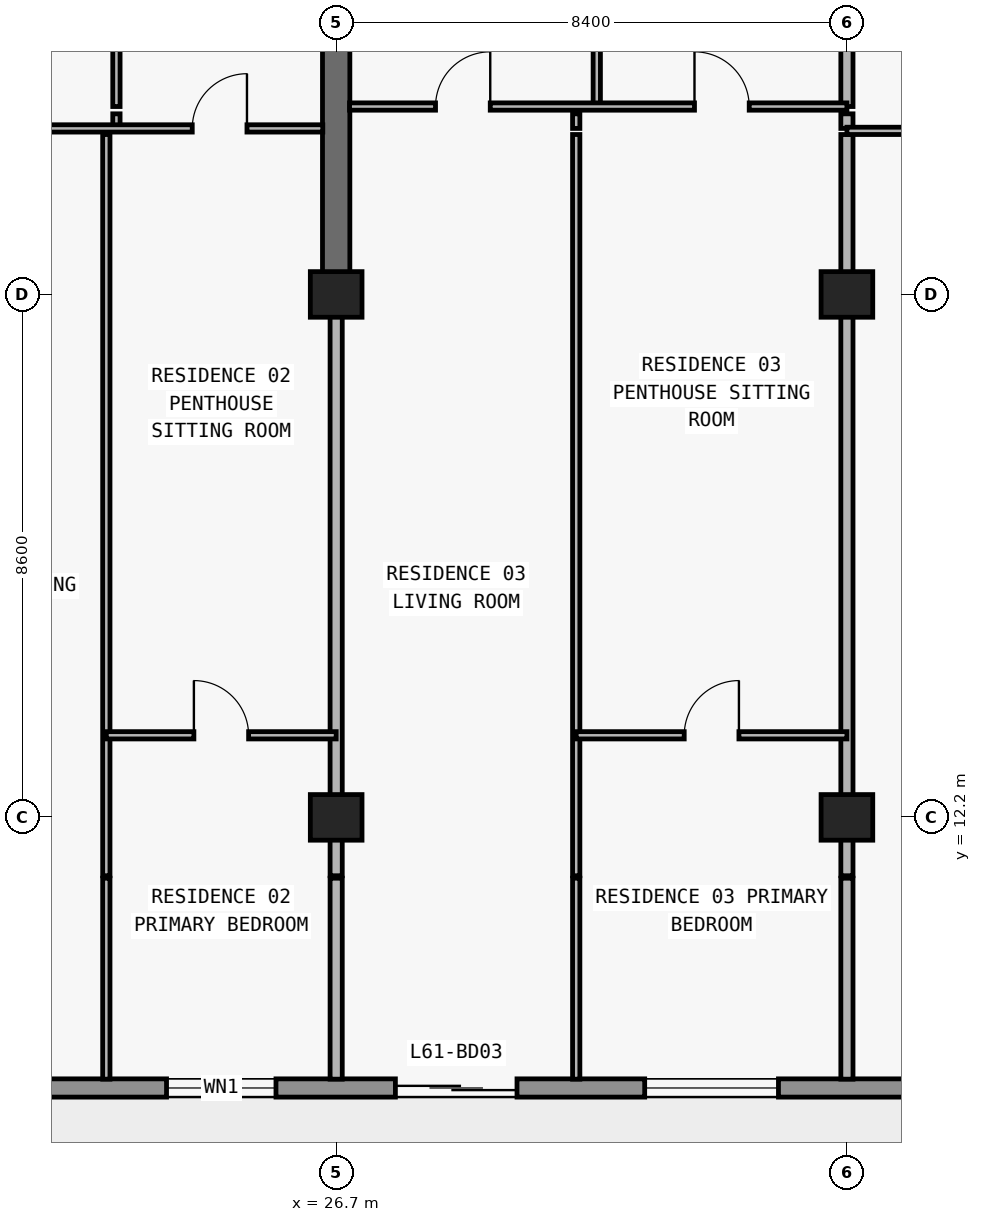
"""IFC4 building model, lengths in metres.
Left out: names, types, materials, properties, quantities, classifications, styles, units other than length and angle.
Written with IfcOpenShell. Run it as: python <this file> out.ifc"""

import sys

from ifc_helpers import new_model, si_unit, direction, frame, frame_2d, origin, origin_2d, place, context, subcontext, project, spatial, rectangle, extrude, element, fill, save


model = new_model("IFC4")
c1 = context("Model", 3, precision=1e-05, world=origin(), true_north=direction((0.0, 1.0)))
c2 = subcontext(c1, "Body", "Model", "MODEL_VIEW")
j1 = project(units=[si_unit("LENGTHUNIT", "METRE"), si_unit("PLANEANGLEUNIT", "RADIAN")], contexts=[c1])
p1 = place(None, origin())
s1 = spatial("IfcSite", under=j1, at=p1, CompositionType="ELEMENT")
p2 = place(p1, origin())
s2 = spatial("IfcBuilding", under=s1, at=p2, CompositionType="ELEMENT")
p3 = place(p2, frame((0.0, 0.0, 218.1)))
s3 = spatial("IfcBuildingStorey", under=s2, at=p3, CompositionType="ELEMENT", Elevation=218.1)
for number, where, z_axis, x_axis in (
    (1, (26.7, 12.2, 0.0), (0.0, 0.0, 1.0), (1.0, 0.0, 0.0)),
    (2, (35.1, 12.2, 0.0), (0.0, 0.0, 1.0), (1.0, 0.0, 0.0)),
    (3, (26.7, 20.8, 0.0), (0.0, 0.0, 1.0), (1.0, 0.0, 0.0)),
    (4, (35.1, 20.8, 0.0), (0.0, 0.0, 1.0), (1.0, 0.0, 0.0)),
):
    element("IfcColumn", number, at=place(p3, frame(where, z_axis=z_axis, x_axis=x_axis)), inside=s3, PredefinedType="COLUMN", context=c2, shape_type="SweptSolid", body=[
        extrude(rectangle(XDim=0.85, YDim=0.75, at=origin_2d()), origin(), (0.0, 0.0, 1.0), 3.0),
    ])
p4 = place(p3, frame((26.7, 20.8, 0.0), z_axis=(0.0, 0.0, 1.0), x_axis=(0.0, 1.0, 0.0)))
e5 = element("IfcWall", 5, at=p4, inside=s3, PredefinedType="SHEAR", context=c2, shape_type="SweptSolid", body=[
    extrude(rectangle(XDim=8.6, YDim=0.45, at=frame_2d((4.3, 0.0))), origin(), (0.0, 0.0, 1.0), 3.0),
])
p5 = place(p3, frame((67.7, 7.75, 0.0), z_axis=(0.0, 0.0, 1.0), x_axis=(-1.0, 0.0, 0.0)))
e6 = element("IfcWall", 6, at=p5, inside=s3, PredefinedType="STANDARD", context=c2, shape_type="SweptSolid", body=[
    extrude(rectangle(XDim=57.6, YDim=0.3, at=frame_2d((28.8, 0.0))), origin(), (0.0, 0.0, 1.0), 3.0),
])
p6 = place(p5, frame((54.673, 0.0, 0.0)))
e7 = element("IfcOpeningElement", 7, at=p6, cuts=e6, PredefinedType="OPENING", context=c2, shape_type="SweptSolid", body=[
    extrude(rectangle(XDim=2.0, YDim=2.3, at=frame_2d((1.0, 1.15))), frame((0.0, 0.16, 0.0), z_axis=(0.0, -1.0, 0.0), x_axis=(1.0, 0.0, 0.0)), (0.0, 0.0, 1.0), 0.32),
])
p7 = place(p5, frame((50.473, 0.0, 0.85)))
e8 = element("IfcOpeningElement", 8, at=p7, cuts=e6, PredefinedType="OPENING", context=c2, shape_type="SweptSolid", body=[
    extrude(rectangle(XDim=2.2, YDim=1.55, at=frame_2d((1.1, 0.775))), frame((0.0, 0.16, 0.0), z_axis=(0.0, -1.0, 0.0), x_axis=(1.0, 0.0, 0.0)), (0.0, 0.0, 1.0), 0.32),
])
p8 = place(p5, frame((46.09, 0.0, 0.0)))
e9 = element("IfcOpeningElement", 9, at=p8, cuts=e6, PredefinedType="OPENING", context=c2, shape_type="SweptSolid", body=[
    extrude(rectangle(XDim=2.0, YDim=2.3, at=frame_2d((1.0, 1.15))), frame((0.0, 0.16, 0.0), z_axis=(0.0, -1.0, 0.0), x_axis=(1.0, 0.0, 0.0)), (0.0, 0.0, 1.0), 0.32),
])
p9 = place(p5, frame((41.99, 0.0, 0.85)))
e10 = element("IfcOpeningElement", 10, at=p9, cuts=e6, PredefinedType="OPENING", context=c2, shape_type="SweptSolid", body=[
    extrude(rectangle(XDim=1.8, YDim=1.55, at=frame_2d((0.9, 0.775))), frame((0.0, 0.16, 0.0), z_axis=(0.0, -1.0, 0.0), x_axis=(1.0, 0.0, 0.0)), (0.0, 0.0, 1.0), 0.32),
])
p10 = place(p5, frame((38.026, 0.0, 0.0)))
e11 = element("IfcOpeningElement", 11, at=p10, cuts=e6, PredefinedType="OPENING", context=c2, shape_type="SweptSolid", body=[
    extrude(rectangle(XDim=2.0, YDim=2.3, at=frame_2d((1.0, 1.15))), frame((0.0, 0.16, 0.0), z_axis=(0.0, -1.0, 0.0), x_axis=(1.0, 0.0, 0.0)), (0.0, 0.0, 1.0), 0.32),
])
p11 = place(p5, frame((33.726, 0.0, 0.85)))
e12 = element("IfcOpeningElement", 12, at=p11, cuts=e6, PredefinedType="OPENING", context=c2, shape_type="SweptSolid", body=[
    extrude(rectangle(XDim=2.2, YDim=1.55, at=frame_2d((1.1, 0.775))), frame((0.0, 0.16, 0.0), z_axis=(0.0, -1.0, 0.0), x_axis=(1.0, 0.0, 0.0)), (0.0, 0.0, 1.0), 0.32),
])
p12 = place(p5, frame((29.51, 0.0, 0.0)))
e13 = element("IfcOpeningElement", 13, at=p12, cuts=e6, PredefinedType="OPENING", context=c2, shape_type="SweptSolid", body=[
    extrude(rectangle(XDim=2.0, YDim=2.3, at=frame_2d((1.0, 1.15))), frame((0.0, 0.16, 0.0), z_axis=(0.0, -1.0, 0.0), x_axis=(1.0, 0.0, 0.0)), (0.0, 0.0, 1.0), 0.32),
])
p13 = place(p5, frame((25.81, 0.0, 0.85)))
e14 = element("IfcOpeningElement", 14, at=p13, cuts=e6, PredefinedType="OPENING", context=c2, shape_type="SweptSolid", body=[
    extrude(rectangle(XDim=1.8, YDim=1.55, at=frame_2d((0.9, 0.775))), frame((0.0, 0.16, 0.0), z_axis=(0.0, -1.0, 0.0), x_axis=(1.0, 0.0, 0.0)), (0.0, 0.0, 1.0), 0.32),
])
p14 = place(p5, frame((22.026, 0.0, 0.0)))
e15 = element("IfcOpeningElement", 15, at=p14, cuts=e6, PredefinedType="OPENING", context=c2, shape_type="SweptSolid", body=[
    extrude(rectangle(XDim=2.0, YDim=2.3, at=frame_2d((1.0, 1.15))), frame((0.0, 0.16, 0.0), z_axis=(0.0, -1.0, 0.0), x_axis=(1.0, 0.0, 0.0)), (0.0, 0.0, 1.0), 0.32),
])
p15 = place(p5, frame((17.726, 0.0, 0.85)))
e16 = element("IfcOpeningElement", 16, at=p15, cuts=e6, PredefinedType="OPENING", context=c2, shape_type="SweptSolid", body=[
    extrude(rectangle(XDim=2.2, YDim=1.55, at=frame_2d((1.1, 0.775))), frame((0.0, 0.16, 0.0), z_axis=(0.0, -1.0, 0.0), x_axis=(1.0, 0.0, 0.0)), (0.0, 0.0, 1.0), 0.32),
])
p16 = place(p5, frame((13.29, 0.0, 0.0)))
e17 = element("IfcOpeningElement", 17, at=p16, cuts=e6, PredefinedType="OPENING", context=c2, shape_type="SweptSolid", body=[
    extrude(rectangle(XDim=2.0, YDim=2.3, at=frame_2d((1.0, 1.15))), frame((0.0, 0.16, 0.0), z_axis=(0.0, -1.0, 0.0), x_axis=(1.0, 0.0, 0.0)), (0.0, 0.0, 1.0), 0.32),
])
p17 = place(p5, frame((9.19, 0.0, 0.85)))
e18 = element("IfcOpeningElement", 18, at=p17, cuts=e6, PredefinedType="OPENING", context=c2, shape_type="SweptSolid", body=[
    extrude(rectangle(XDim=1.8, YDim=1.55, at=frame_2d((0.9, 0.775))), frame((0.0, 0.16, 0.0), z_axis=(0.0, -1.0, 0.0), x_axis=(1.0, 0.0, 0.0)), (0.0, 0.0, 1.0), 0.32),
])
p18 = place(p5, frame((5.273, 0.0, 0.0)))
e19 = element("IfcOpeningElement", 19, at=p18, cuts=e6, PredefinedType="OPENING", context=c2, shape_type="SweptSolid", body=[
    extrude(rectangle(XDim=2.0, YDim=2.3, at=frame_2d((1.0, 1.15))), frame((0.0, 0.16, 0.0), z_axis=(0.0, -1.0, 0.0), x_axis=(1.0, 0.0, 0.0)), (0.0, 0.0, 1.0), 0.32),
])
p19 = place(p5, frame((1.073, 0.0, 0.85)))
e20 = element("IfcOpeningElement", 20, at=p19, cuts=e6, PredefinedType="OPENING", context=c2, shape_type="SweptSolid", body=[
    extrude(rectangle(XDim=2.2, YDim=1.55, at=frame_2d((1.1, 0.775))), frame((0.0, 0.16, 0.0), z_axis=(0.0, -1.0, 0.0), x_axis=(1.0, 0.0, 0.0)), (0.0, 0.0, 1.0), 0.32),
])
p20 = place(p3, frame((22.92, 7.895, 0.0), z_axis=(0.0, 0.0, 1.0), x_axis=(0.0, 1.0, 0.0)))
e21 = element("IfcWall", 21, at=p20, inside=s3, PredefinedType="PARTITIONING", context=c2, shape_type="SweptSolid", body=[
    extrude(rectangle(XDim=3.305, YDim=0.12, at=frame_2d((1.652, 0.0))), origin(), (0.0, 0.0, 1.0), 3.0),
])
p21 = place(p3, frame((22.92, 11.24, 0.0), z_axis=(0.0, 0.0, 1.0), x_axis=(0.0, 1.0, 0.0)))
e22 = element("IfcWall", 22, at=p21, inside=s3, PredefinedType="PARTITIONING", context=c2, shape_type="SweptSolid", body=[
    extrude(rectangle(XDim=12.19, YDim=0.12, at=frame_2d((6.095, 0.0))), origin(), (0.0, 0.0, 1.0), 3.0),
])
p22 = place(p3, frame((23.086, 23.53, 0.0), z_axis=(0.0, 0.0, 1.0), x_axis=(0.0, 1.0, 0.0)))
e23 = element("IfcWall", 23, at=p22, inside=s3, PredefinedType="PARTITIONING", context=c2, shape_type="SweptSolid", body=[
    extrude(rectangle(XDim=0.24, YDim=0.12, at=frame_2d((0.12, 0.0))), origin(), (0.0, 0.0, 1.0), 3.0),
])
p23 = place(p3, frame((23.086, 23.89, 0.0), z_axis=(0.0, 0.0, 1.0), x_axis=(0.0, 1.0, 0.0)))
e24 = element("IfcWall", 24, at=p23, inside=s3, PredefinedType="PARTITIONING", context=c2, shape_type="SweptSolid", body=[
    extrude(rectangle(XDim=4.69, YDim=0.12, at=frame_2d((2.345, 0.0))), origin(), (0.0, 0.0, 1.0), 3.0),
])
p24 = place(p23, frame((1.895, 0.0, 0.0)))
e25 = element("IfcOpeningElement", 25, at=p24, cuts=e24, PredefinedType="OPENING", context=c2, shape_type="SweptSolid", body=[
    extrude(rectangle(XDim=0.9, YDim=2.15, at=frame_2d((0.45, 1.075))), frame((0.0, 0.07, 0.0), z_axis=(0.0, -1.0, 0.0), x_axis=(1.0, 0.0, 0.0)), (0.0, 0.0, 1.0), 0.14),
])
p25 = place(p3, frame((26.7, 7.895, 0.0), z_axis=(0.0, 0.0, 1.0), x_axis=(0.0, 1.0, 0.0)))
e26 = element("IfcWall", 26, at=p25, inside=s3, PredefinedType="PARTITIONING", context=c2, shape_type="SweptSolid", body=[
    extrude(rectangle(XDim=3.305, YDim=0.2, at=frame_2d((1.652, 0.0))), origin(), (0.0, 0.0, 1.0), 3.0),
])
p26 = place(p3, frame((26.7, 11.24, 0.0), z_axis=(0.0, 0.0, 1.0), x_axis=(0.0, 1.0, 0.0)))
e27 = element("IfcWall", 27, at=p26, inside=s3, PredefinedType="PARTITIONING", context=c2, shape_type="SweptSolid", body=[
    extrude(rectangle(XDim=9.555, YDim=0.2, at=frame_2d((4.777, 0.0))), origin(), (0.0, 0.0, 1.0), 2.213),
])
p27 = place(p3, frame((30.648, 7.895, 0.0), z_axis=(0.0, 0.0, 1.0), x_axis=(0.0, 1.0, 0.0)))
e28 = element("IfcWall", 28, at=p27, inside=s3, PredefinedType="PARTITIONING", context=c2, shape_type="SweptSolid", body=[
    extrude(rectangle(XDim=3.305, YDim=0.12, at=frame_2d((1.652, 0.0))), origin(), (0.0, 0.0, 1.0), 3.0),
])
p28 = place(p3, frame((30.648, 11.24, 0.0), z_axis=(0.0, 0.0, 1.0), x_axis=(0.0, 1.0, 0.0)))
e29 = element("IfcWall", 29, at=p28, inside=s3, PredefinedType="PARTITIONING", context=c2, shape_type="SweptSolid", body=[
    extrude(rectangle(XDim=12.19, YDim=0.12, at=frame_2d((6.095, 0.0))), origin(), (0.0, 0.0, 1.0), 3.0),
])
p29 = place(p3, frame((30.648, 23.53, 0.0), z_axis=(0.0, 0.0, 1.0), x_axis=(0.0, 1.0, 0.0)))
e30 = element("IfcWall", 30, at=p29, inside=s3, PredefinedType="PARTITIONING", context=c2, shape_type="SweptSolid", body=[
    extrude(rectangle(XDim=0.24, YDim=0.12, at=frame_2d((0.12, 0.0))), origin(), (0.0, 0.0, 1.0), 3.0),
])
p30 = place(p3, frame((30.986, 23.89, 0.0), z_axis=(0.0, 0.0, 1.0), x_axis=(0.0, 1.0, 0.0)))
e31 = element("IfcWall", 31, at=p30, inside=s3, PredefinedType="PARTITIONING", context=c2, shape_type="SweptSolid", body=[
    extrude(rectangle(XDim=4.69, YDim=0.12, at=frame_2d((2.345, 0.0))), origin(), (0.0, 0.0, 1.0), 2.449),
])
p31 = place(p30, frame((1.895, 0.0, 0.0)))
e32 = element("IfcOpeningElement", 32, at=p31, cuts=e31, PredefinedType="OPENING", context=c2, shape_type="SweptSolid", body=[
    extrude(rectangle(XDim=0.9, YDim=2.15, at=frame_2d((0.45, 1.075))), frame((0.0, 0.07, 0.0), z_axis=(0.0, -1.0, 0.0), x_axis=(1.0, 0.0, 0.0)), (0.0, 0.0, 1.0), 0.14),
])
p32 = place(p3, frame((35.1, 7.895, 0.0), z_axis=(0.0, 0.0, 1.0), x_axis=(0.0, 1.0, 0.0)))
e33 = element("IfcWall", 33, at=p32, inside=s3, PredefinedType="PARTITIONING", context=c2, shape_type="SweptSolid", body=[
    extrude(rectangle(XDim=3.305, YDim=0.2, at=frame_2d((1.652, 0.0))), origin(), (0.0, 0.0, 1.0), 3.0),
])
p33 = place(p3, frame((35.1, 11.24, 0.0), z_axis=(0.0, 0.0, 1.0), x_axis=(0.0, 1.0, 0.0)))
e34 = element("IfcWall", 34, at=p33, inside=s3, PredefinedType="PARTITIONING", context=c2, shape_type="SweptSolid", body=[
    extrude(rectangle(XDim=12.19, YDim=0.2, at=frame_2d((6.095, 0.0))), origin(), (0.0, 0.0, 1.0), 2.213),
])
p34 = place(p3, frame((35.1, 23.53, 0.0), z_axis=(0.0, 0.0, 1.0), x_axis=(0.0, 1.0, 0.0)))
e35 = element("IfcWall", 35, at=p34, inside=s3, PredefinedType="PARTITIONING", context=c2, shape_type="SweptSolid", body=[
    extrude(rectangle(XDim=0.24, YDim=0.2, at=frame_2d((0.12, 0.0))), origin(), (0.0, 0.0, 1.0), 2.213),
])
p35 = place(p3, frame((35.1, 23.89, 0.0), z_axis=(0.0, 0.0, 1.0), x_axis=(0.0, 1.0, 0.0)))
e36 = element("IfcWall", 36, at=p35, inside=s3, PredefinedType="PARTITIONING", context=c2, shape_type="SweptSolid", body=[
    extrude(rectangle(XDim=4.69, YDim=0.2, at=frame_2d((2.345, 0.0))), origin(), (0.0, 0.0, 1.0), 2.213),
])
p36 = place(p3, frame((22.92, 13.55, 0.0), z_axis=(0.0, 0.0, 1.0), x_axis=(1.0, 0.0, 0.0)))
e37 = element("IfcWall", 37, at=p36, inside=s3, PredefinedType="PARTITIONING", context=c2, shape_type="SweptSolid", body=[
    extrude(rectangle(XDim=3.78, YDim=0.12, at=frame_2d((1.89, 0.0))), origin(), (0.0, 0.0, 1.0), 3.0),
])
p37 = place(p36, frame((1.44, 0.0, 0.0)))
e38 = element("IfcOpeningElement", 38, at=p37, cuts=e37, PredefinedType="OPENING", context=c2, shape_type="SweptSolid", body=[
    extrude(rectangle(XDim=0.9, YDim=2.15, at=frame_2d((0.45, 1.075))), frame((0.0, 0.07, 0.0), z_axis=(0.0, -1.0, 0.0), x_axis=(1.0, 0.0, 0.0)), (0.0, 0.0, 1.0), 0.14),
])
p38 = place(p3, frame((30.648, 13.55, 0.0), z_axis=(0.0, 0.0, 1.0), x_axis=(1.0, 0.0, 0.0)))
e39 = element("IfcWall", 39, at=p38, inside=s3, PredefinedType="PARTITIONING", context=c2, shape_type="SweptSolid", body=[
    extrude(rectangle(XDim=4.452, YDim=0.12, at=frame_2d((2.226, 0.0))), origin(), (0.0, 0.0, 1.0), 3.0),
])
p39 = place(p38, frame((1.776, 0.0, 0.0)))
e40 = element("IfcOpeningElement", 40, at=p39, cuts=e39, PredefinedType="OPENING", context=c2, shape_type="SweptSolid", body=[
    extrude(rectangle(XDim=0.9, YDim=2.15, at=frame_2d((0.45, 1.075))), frame((0.0, 0.07, 0.0), z_axis=(0.0, -1.0, 0.0), x_axis=(1.0, 0.0, 0.0)), (0.0, 0.0, 1.0), 0.14),
])
p40 = place(p3, frame((35.1, 23.49, 0.0), z_axis=(0.0, 0.0, 1.0), x_axis=(1.0, 0.0, 0.0)))
e41 = element("IfcWall", 41, at=p40, inside=s3, PredefinedType="PARTITIONING", context=c2, shape_type="SweptSolid", body=[
    extrude(rectangle(XDim=4.104, YDim=0.12, at=frame_2d((2.052, 0.0))), origin(), (0.0, 0.0, 1.0), 3.0),
])
p41 = place(p40, frame((1.602, 0.0, 0.0)))
e42 = element("IfcOpeningElement", 42, at=p41, cuts=e41, PredefinedType="OPENING", context=c2, shape_type="SweptSolid", body=[
    extrude(rectangle(XDim=0.9, YDim=2.15, at=frame_2d((0.45, 1.075))), frame((0.0, 0.07, 0.0), z_axis=(0.0, -1.0, 0.0), x_axis=(1.0, 0.0, 0.0)), (0.0, 0.0, 1.0), 0.14),
])
p42 = place(p3, frame((18.3, 23.53, 0.0), z_axis=(0.0, 0.0, 1.0), x_axis=(1.0, 0.0, 0.0)))
e43 = element("IfcWall", 43, at=p42, inside=s3, PredefinedType="PARTITIONING", context=c2, shape_type="SweptSolid", body=[
    extrude(rectangle(XDim=8.18, YDim=0.12, at=frame_2d((4.09, 0.0))), origin(), (0.0, 0.0, 1.0), 3.0),
])
p43 = place(p42, frame((1.86, 0.0, 0.0)))
e44 = element("IfcOpeningElement", 44, at=p43, cuts=e43, PredefinedType="OPENING", context=c2, shape_type="SweptSolid", body=[
    extrude(rectangle(XDim=0.9, YDim=2.15, at=frame_2d((0.45, 1.075))), frame((0.0, 0.07, 0.0), z_axis=(0.0, -1.0, 0.0), x_axis=(1.0, 0.0, 0.0)), (0.0, 0.0, 1.0), 0.14),
])
p44 = place(p42, frame((6.033, 0.0, 0.0)))
e45 = element("IfcOpeningElement", 45, at=p44, cuts=e43, PredefinedType="OPENING", context=c2, shape_type="SweptSolid", body=[
    extrude(rectangle(XDim=0.9, YDim=2.15, at=frame_2d((0.45, 1.075))), frame((0.0, 0.07, 0.0), z_axis=(0.0, -1.0, 0.0), x_axis=(1.0, 0.0, 0.0)), (0.0, 0.0, 1.0), 0.14),
])
p45 = place(p3, frame((26.92, 23.89, 0.0), z_axis=(0.0, 0.0, 1.0), x_axis=(1.0, 0.0, 0.0)))
e46 = element("IfcWall", 46, at=p45, inside=s3, PredefinedType="PARTITIONING", context=c2, shape_type="SweptSolid", body=[
    extrude(rectangle(XDim=8.18, YDim=0.12, at=frame_2d((4.09, 0.0))), origin(), (0.0, 0.0, 1.0), 3.0),
])
p46 = place(p45, frame((1.414, 0.0, 0.0)))
e47 = element("IfcOpeningElement", 47, at=p46, cuts=e46, PredefinedType="OPENING", context=c2, shape_type="SweptSolid", body=[
    extrude(rectangle(XDim=0.9, YDim=2.15, at=frame_2d((0.45, 1.075))), frame((0.0, 0.07, 0.0), z_axis=(0.0, -1.0, 0.0), x_axis=(1.0, 0.0, 0.0)), (0.0, 0.0, 1.0), 0.14),
])
p47 = place(p45, frame((5.673, 0.0, 0.0)))
e48 = element("IfcOpeningElement", 48, at=p47, cuts=e46, PredefinedType="OPENING", context=c2, shape_type="SweptSolid", body=[
    extrude(rectangle(XDim=0.9, YDim=2.15, at=frame_2d((0.45, 1.075))), frame((0.0, 0.07, 0.0), z_axis=(0.0, -1.0, 0.0), x_axis=(1.0, 0.0, 0.0)), (0.0, 0.0, 1.0), 0.14),
])
p48 = place(p9, origin())
e49 = element("IfcWindow", 49, at=p48, inside=s3, PartitioningType="SINGLE_PANEL", PredefinedType="WINDOW", context=c2, shape_type="SweptSolid", body=[
    extrude(rectangle(XDim=1.8, YDim=1.55, at=frame_2d((0.9, 0.775))), frame((0.0, 0.03, 0.0), z_axis=(0.0, -1.0, 0.0), x_axis=(1.0, 0.0, 0.0)), (0.0, 0.0, 1.0), 0.06),
])
fill(e10, e49)
p49 = place(p10, origin())
e50 = element("IfcDoor", 50, at=p49, inside=s3, OperationType="DOUBLE_DOOR_SLIDING", PredefinedType="DOOR", context=c2, shape_type="SweptSolid", body=[
    extrude(rectangle(XDim=2.0, YDim=2.3, at=frame_2d((1.0, 1.15))), frame((0.0, 0.025, 0.0), z_axis=(0.0, -1.0, 0.0), x_axis=(1.0, 0.0, 0.0)), (0.0, 0.0, 1.0), 0.05),
])
fill(e11, e50)
p50 = place(p11, origin())
e51 = element("IfcWindow", 51, at=p50, inside=s3, PartitioningType="SINGLE_PANEL", PredefinedType="WINDOW", context=c2, shape_type="SweptSolid", body=[
    extrude(rectangle(XDim=2.2, YDim=1.55, at=frame_2d((1.1, 0.775))), frame((0.0, 0.03, 0.0), z_axis=(0.0, -1.0, 0.0), x_axis=(1.0, 0.0, 0.0)), (0.0, 0.0, 1.0), 0.06),
])
fill(e12, e51)
p51 = place(p44, origin())
e52 = element("IfcDoor", 52, at=p51, inside=s3, OperationType="SINGLE_SWING_RIGHT", PredefinedType="DOOR", context=c2, shape_type="SweptSolid", body=[
    extrude(rectangle(XDim=0.9, YDim=2.15, at=frame_2d((0.45, 1.075))), frame((0.0, 0.025, 0.0), z_axis=(0.0, -1.0, 0.0), x_axis=(1.0, 0.0, 0.0)), (0.0, 0.0, 1.0), 0.05),
])
fill(e45, e52)
p52 = place(p37, origin())
e53 = element("IfcDoor", 53, at=p52, inside=s3, OperationType="SINGLE_SWING_LEFT", PredefinedType="DOOR", context=c2, shape_type="SweptSolid", body=[
    extrude(rectangle(XDim=0.9, YDim=2.15, at=frame_2d((0.45, 1.075))), frame((0.0, 0.025, 0.0), z_axis=(0.0, -1.0, 0.0), x_axis=(1.0, 0.0, 0.0)), (0.0, 0.0, 1.0), 0.05),
])
fill(e38, e53)
p53 = place(p46, origin())
e54 = element("IfcDoor", 54, at=p53, inside=s3, OperationType="SINGLE_SWING_RIGHT", PredefinedType="DOOR", context=c2, shape_type="SweptSolid", body=[
    extrude(rectangle(XDim=0.9, YDim=2.15, at=frame_2d((0.45, 1.075))), frame((0.0, 0.025, 0.0), z_axis=(0.0, -1.0, 0.0), x_axis=(1.0, 0.0, 0.0)), (0.0, 0.0, 1.0), 0.05),
])
fill(e47, e54)
p54 = place(p47, origin())
e55 = element("IfcDoor", 55, at=p54, inside=s3, OperationType="SINGLE_SWING_LEFT", PredefinedType="DOOR", context=c2, shape_type="SweptSolid", body=[
    extrude(rectangle(XDim=0.9, YDim=2.15, at=frame_2d((0.45, 1.075))), frame((0.0, 0.025, 0.0), z_axis=(0.0, -1.0, 0.0), x_axis=(1.0, 0.0, 0.0)), (0.0, 0.0, 1.0), 0.05),
])
fill(e48, e55)
p55 = place(p39, origin())
e56 = element("IfcDoor", 56, at=p55, inside=s3, OperationType="SINGLE_SWING_RIGHT", PredefinedType="DOOR", context=c2, shape_type="SweptSolid", body=[
    extrude(rectangle(XDim=0.9, YDim=2.15, at=frame_2d((0.45, 1.075))), frame((0.0, 0.025, 0.0), z_axis=(0.0, -1.0, 0.0), x_axis=(1.0, 0.0, 0.0)), (0.0, 0.0, 1.0), 0.05),
])
fill(e40, e56)
save(model, sys.argv[1])
